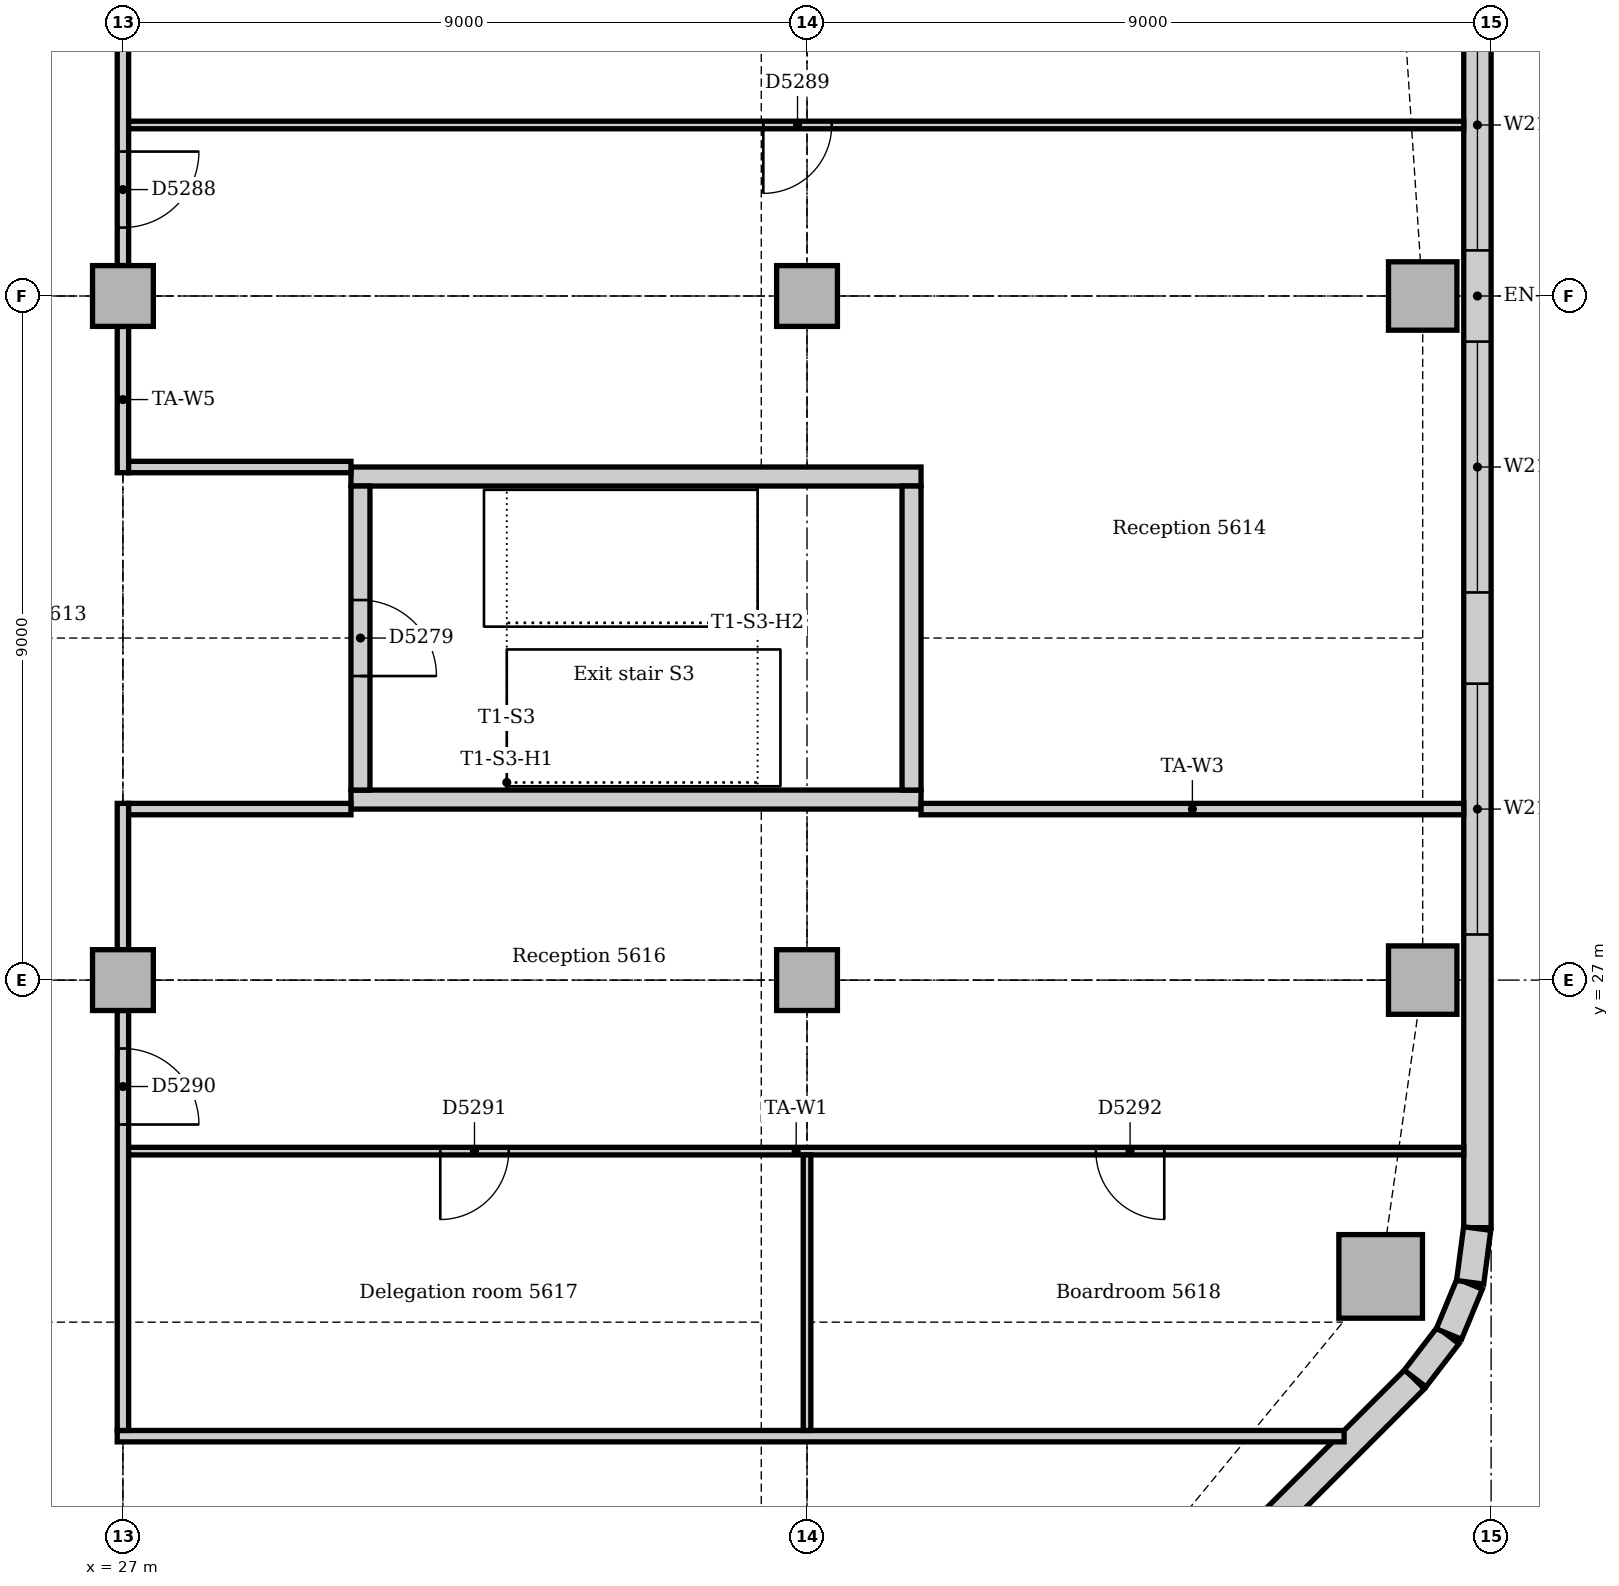
"""IFC4 building model, lengths in metres.
Left out: names, types, materials, properties, quantities, classifications, styles, units other than length and angle.
Written with IfcOpenShell. Run it as: python <this file> out.ifc"""

import sys

from ifc_helpers import new_model, si_unit, direction, frame, frame_2d, origin, origin_2d, place, context, subcontext, project, spatial, rectangle, extrude, element, fill, save


model = new_model("IFC4")
c1 = context("Model", 3, precision=1e-05, world=origin(), true_north=direction((0.0, 1.0)))
c2 = subcontext(c1, "Body", "Model", "MODEL_VIEW")
j1 = project(units=[si_unit("LENGTHUNIT", "METRE"), si_unit("PLANEANGLEUNIT", "RADIAN")], contexts=[c1])
p1 = place(None, origin())
s1 = spatial("IfcSite", under=j1, at=p1, CompositionType="ELEMENT")
p2 = place(p1, origin())
s2 = spatial("IfcBuilding", under=s1, at=p2, CompositionType="ELEMENT")
p3 = place(p2, frame((0.0, 0.0, 234.0)))
s3 = spatial("IfcBuildingStorey", under=s2, at=p3, CompositionType="ELEMENT", Elevation=234.0)
for number, where, z_axis, x_axis in (
    (1, (30.0, 29.375, 0.0), (0.0, 0.0, 1.0), (1.0, 0.0, 0.0)),
    (2, (37.5, 33.625, 0.0), (0.0, 0.0, 1.0), (-1.0, 0.0, 0.0)),
):
    element("IfcWall", number, at=place(p3, frame(where, z_axis=z_axis, x_axis=x_axis)), inside=s3, PredefinedType="SOLIDWALL", context=c2, shape_type="SweptSolid", body=[
        extrude(rectangle(XDim=7.5, YDim=0.25, at=frame_2d((3.75, 0.0))), origin(), (0.0, 0.0, 1.0), 4.0),
    ])
p4 = place(p3, frame((37.375, 29.5, 0.0), z_axis=(0.0, 0.0, 1.0), x_axis=(0.0, 1.0, 0.0)))
e3 = element("IfcWall", 3, at=p4, inside=s3, PredefinedType="SOLIDWALL", context=c2, shape_type="SweptSolid", body=[
    extrude(rectangle(XDim=4.0, YDim=0.25, at=frame_2d((2.0, 0.0))), origin(), (0.0, 0.0, 1.0), 4.0),
])
p5 = place(p3, frame((30.125, 33.5, 0.0), z_axis=(0.0, 0.0, 1.0), x_axis=(0.0, -1.0, 0.0)))
e4 = element("IfcWall", 4, at=p5, inside=s3, PredefinedType="SOLIDWALL", context=c2, shape_type="SweptSolid", body=[
    extrude(rectangle(XDim=4.0, YDim=0.25, at=frame_2d((2.0, 0.0))), origin(), (0.0, 0.0, 1.0), 4.0),
])
p6 = place(p5, frame((1.5, 0.0, 0.0)))
e5 = element("IfcOpeningElement", 5, at=p6, cuts=e4, PredefinedType="OPENING", context=c2, shape_type="SweptSolid", body=[
    extrude(rectangle(XDim=1.0, YDim=2.1, at=frame_2d((0.5, 1.05))), frame((0.0, 0.135, 0.0), z_axis=(0.0, -1.0, 0.0), x_axis=(1.0, 0.0, 0.0)), (0.0, 0.0, 1.0), 0.27),
])
p7 = place(p3, frame((43.547, 23.102, 0.0), z_axis=(0.0, 0.0, 1.0), x_axis=(1.0, 0.0, 0.0)))
e6 = element("IfcColumn", 6, at=p7, inside=s3, PredefinedType="COLUMN", context=c2, shape_type="SweptSolid", body=[
    extrude(rectangle(XDim=1.1, YDim=1.1, at=origin_2d()), origin(), (0.0, 0.0, 1.0), 3.85),
])
for number, where, z_axis, x_axis in (
    (7, (44.1, 27.0, 0.0), (0.0, 0.0, 1.0), (1.0, 0.0, 0.0)),
    (8, (44.1, 36.0, 0.0), (0.0, 0.0, 1.0), (1.0, 0.0, 0.0)),
):
    element("IfcColumn", number, at=place(p3, frame(where, z_axis=z_axis, x_axis=x_axis)), inside=s3, PredefinedType="COLUMN", context=c2, shape_type="SweptSolid", body=[
        extrude(rectangle(XDim=0.9, YDim=0.9, at=origin_2d()), origin(), (0.0, 0.0, 1.0), 3.85),
    ])
for number, where, z_axis, x_axis in (
    (9, (27.0, 27.0, 0.0), (0.0, 0.0, 1.0), (1.0, 0.0, 0.0)),
    (10, (27.0, 36.0, 0.0), (0.0, 0.0, 1.0), (1.0, 0.0, 0.0)),
    (11, (36.0, 27.0, 0.0), (0.0, 0.0, 1.0), (1.0, 0.0, 0.0)),
    (12, (36.0, 36.0, 0.0), (0.0, 0.0, 1.0), (1.0, 0.0, 0.0)),
):
    element("IfcColumn", number, at=place(p3, frame(where, z_axis=z_axis, x_axis=x_axis)), inside=s3, PredefinedType="COLUMN", context=c2, shape_type="SweptSolid", body=[
        extrude(rectangle(XDim=0.8, YDim=0.8, at=origin_2d()), origin(), (0.0, 0.0, 1.0), 3.85),
    ])
p8 = place(p3, frame((36.751, 14.506, 0.0), z_axis=(0.0, 0.0, 1.0), x_axis=(0.707106781187, 0.707106781187, 0.0)))
e13 = element("IfcWall", 13, at=p8, inside=s3, PredefinedType="STANDARD", context=c2, shape_type="SweptSolid", body=[
    extrude(rectangle(XDim=10.243, YDim=0.36, at=frame_2d((5.121, 0.0))), origin(), (0.0, 0.0, 1.0), 3.85),
])
p9 = place(p8, frame((5.021, 0.0, 0.9)))
e14 = element("IfcOpeningElement", 14, at=p9, cuts=e13, PredefinedType="OPENING", context=c2, shape_type="SweptSolid", body=[
    extrude(rectangle(XDim=1.8, YDim=1.6, at=frame_2d((0.9, 0.8))), frame((0.0, 0.19, 0.0), z_axis=(0.0, -1.0, 0.0), x_axis=(1.0, 0.0, 0.0)), (0.0, 0.0, 1.0), 0.38),
])
p10 = place(p3, frame((44.82, 23.743, 0.0), z_axis=(0.0, 0.0, 1.0), x_axis=(0.0, 1.0, 0.0)))
e15 = element("IfcWall", 15, at=p10, inside=s3, PredefinedType="STANDARD", context=c2, shape_type="SweptSolid", body=[
    extrude(rectangle(XDim=24.515, YDim=0.36, at=frame_2d((12.257, 0.0))), origin(), (0.0, 0.0, 1.0), 3.85),
])
p11 = place(p10, frame((3.857, 0.0, 0.9)))
e16 = element("IfcOpeningElement", 16, at=p11, cuts=e15, PredefinedType="OPENING", context=c2, shape_type="SweptSolid", body=[
    extrude(rectangle(XDim=3.3, YDim=1.6, at=frame_2d((1.65, 0.8))), frame((0.0, 0.19, 0.0), z_axis=(0.0, -1.0, 0.0), x_axis=(1.0, 0.0, 0.0)), (0.0, 0.0, 1.0), 0.38),
])
p12 = place(p10, frame((8.357, 0.0, 0.9)))
e17 = element("IfcOpeningElement", 17, at=p12, cuts=e15, PredefinedType="OPENING", context=c2, shape_type="SweptSolid", body=[
    extrude(rectangle(XDim=3.3, YDim=1.6, at=frame_2d((1.65, 0.8))), frame((0.0, 0.19, 0.0), z_axis=(0.0, -1.0, 0.0), x_axis=(1.0, 0.0, 0.0)), (0.0, 0.0, 1.0), 0.38),
])
p13 = place(p10, frame((12.857, 0.0, 0.9)))
e18 = element("IfcOpeningElement", 18, at=p13, cuts=e15, PredefinedType="OPENING", context=c2, shape_type="SweptSolid", body=[
    extrude(rectangle(XDim=3.3, YDim=1.6, at=frame_2d((1.65, 0.8))), frame((0.0, 0.19, 0.0), z_axis=(0.0, -1.0, 0.0), x_axis=(1.0, 0.0, 0.0)), (0.0, 0.0, 1.0), 0.38),
])
p14 = place(p10, frame((17.357, 0.0, 0.9)))
e19 = element("IfcOpeningElement", 19, at=p14, cuts=e15, PredefinedType="OPENING", context=c2, shape_type="SweptSolid", body=[
    extrude(rectangle(XDim=3.3, YDim=1.6, at=frame_2d((1.65, 0.8))), frame((0.0, 0.19, 0.0), z_axis=(0.0, -1.0, 0.0), x_axis=(1.0, 0.0, 0.0)), (0.0, 0.0, 1.0), 0.38),
])
p15 = place(p3, frame((44.0, 21.759, 0.0), z_axis=(0.0, 0.0, 1.0), x_axis=(0.608802368033, 0.793321924995, 0.0)))
e20 = element("IfcWall", 20, at=p15, inside=s3, PredefinedType="STANDARD", context=c2, shape_type="SweptSolid", body=[
    extrude(rectangle(XDim=0.713, YDim=0.36, at=frame_2d((0.357, 0.0))), origin(), (0.0, 0.0, 1.0), 3.85),
])
for number, where, z_axis, x_axis in (
    (21, (44.445, 22.344, 0.0), (0.0, 0.0, 1.0), (0.383, 0.924, 0.0)),
    (22, (44.724, 23.024, 0.0), (0.0, 0.0, 1.0), (0.131, 0.991, 0.0)),
):
    element("IfcWall", number, at=place(p3, frame(where, z_axis=z_axis, x_axis=x_axis)), inside=s3, PredefinedType="STANDARD", context=c2, shape_type="SweptSolid", body=[
        extrude(rectangle(XDim=0.713, YDim=0.36, at=frame_2d((0.356, 0.0))), origin(), (0.0, 0.0, 1.0), 3.85),
    ])
p16 = place(p3, frame((26.925, 21.0, 0.0), z_axis=(0.0, 0.0, 1.0), x_axis=(1.0, 0.0, 0.0)))
e23 = element("IfcWall", 23, at=p16, inside=s3, PredefinedType="PARTITIONING", context=c2, shape_type="SweptSolid", body=[
    extrude(rectangle(XDim=16.141, YDim=0.15, at=frame_2d((8.07, 0.0))), origin(), (0.0, 0.0, 1.0), 3.85),
])
p17 = place(p3, frame((27.0, 33.675, 0.0), z_axis=(0.0, 0.0, 1.0), x_axis=(0.0, 1.0, 0.0)))
e24 = element("IfcWall", 24, at=p17, inside=s3, PredefinedType="PARTITIONING", context=c2, shape_type="SweptSolid", body=[
    extrude(rectangle(XDim=1.925, YDim=0.15, at=frame_2d((0.963, 0.0))), origin(), (0.0, 0.0, 1.0), 3.35),
])
p18 = place(p3, frame((27.0, 36.4, 0.0), z_axis=(0.0, 0.0, 1.0), x_axis=(0.0, 1.0, 0.0)))
e25 = element("IfcWall", 25, at=p18, inside=s3, PredefinedType="PARTITIONING", context=c2, shape_type="SweptSolid", body=[
    extrude(rectangle(XDim=7.3, YDim=0.15, at=frame_2d((3.65, 0.0))), origin(), (0.0, 0.0, 1.0), 3.35),
])
p19 = place(p18, frame((0.5, 0.0, 0.0)))
e26 = element("IfcOpeningElement", 26, at=p19, cuts=e25, PredefinedType="OPENING", context=c2, shape_type="SweptSolid", body=[
    extrude(rectangle(XDim=1.0, YDim=2.1, at=frame_2d((0.5, 1.05))), frame((0.0, 0.085, 0.0), z_axis=(0.0, -1.0, 0.0), x_axis=(1.0, 0.0, 0.0)), (0.0, 0.0, 1.0), 0.17),
])
p20 = place(p3, frame((27.0, 21.075, 0.0), z_axis=(0.0, 0.0, 1.0), x_axis=(0.0, 1.0, 0.0)))
e27 = element("IfcWall", 27, at=p20, inside=s3, PredefinedType="PARTITIONING", context=c2, shape_type="SweptSolid", body=[
    extrude(rectangle(XDim=5.525, YDim=0.15, at=frame_2d((2.763, 0.0))), origin(), (0.0, 0.0, 1.0), 3.35),
])
p21 = place(p20, frame((4.025, 0.0, 0.0)))
e28 = element("IfcOpeningElement", 28, at=p21, cuts=e27, PredefinedType="OPENING", context=c2, shape_type="SweptSolid", body=[
    extrude(rectangle(XDim=1.0, YDim=2.1, at=frame_2d((0.5, 1.05))), frame((0.0, 0.085, 0.0), z_axis=(0.0, -1.0, 0.0), x_axis=(1.0, 0.0, 0.0)), (0.0, 0.0, 1.0), 0.17),
])
p22 = place(p3, frame((27.0, 27.4, 0.0), z_axis=(0.0, 0.0, 1.0), x_axis=(0.0, 1.0, 0.0)))
e29 = element("IfcWall", 29, at=p22, inside=s3, PredefinedType="PARTITIONING", context=c2, shape_type="SweptSolid", body=[
    extrude(rectangle(XDim=1.925, YDim=0.15, at=frame_2d((0.963, 0.0))), origin(), (0.0, 0.0, 1.0), 3.35),
])
for number, where, z_axis, x_axis in (
    (30, (27.075, 29.25, 0.0), (0.0, 0.0, 1.0), (1.0, 0.0, 0.0)),
    (31, (27.075, 33.75, 0.0), (0.0, 0.0, 1.0), (1.0, 0.0, 0.0)),
):
    element("IfcWall", number, at=place(p3, frame(where, z_axis=z_axis, x_axis=x_axis)), inside=s3, PredefinedType="PARTITIONING", context=c2, shape_type="SweptSolid", body=[
        extrude(rectangle(XDim=2.925, YDim=0.15, at=frame_2d((1.462, 0.0))), origin(), (0.0, 0.0, 1.0), 3.85),
    ])
p23 = place(p3, frame((37.5, 29.25, 0.0), z_axis=(0.0, 0.0, 1.0), x_axis=(1.0, 0.0, 0.0)))
e32 = element("IfcWall", 32, at=p23, inside=s3, PredefinedType="PARTITIONING", context=c2, shape_type="SweptSolid", body=[
    extrude(rectangle(XDim=7.14, YDim=0.15, at=frame_2d((3.57, 0.0))), origin(), (0.0, 0.0, 1.0), 3.85),
])
p24 = place(p3, frame((27.075, 24.75, 0.0), z_axis=(0.0, 0.0, 1.0), x_axis=(1.0, 0.0, 0.0)))
e33 = element("IfcWall", 33, at=p24, inside=s3, PredefinedType="PARTITIONING", context=c2, shape_type="SweptSolid", body=[
    extrude(rectangle(XDim=17.565, YDim=0.1, at=frame_2d((8.783, 0.0))), origin(), (0.0, 0.0, 1.0), 3.85),
])
p25 = place(p24, frame((4.1, 0.0, 0.0)))
e34 = element("IfcOpeningElement", 34, at=p25, cuts=e33, PredefinedType="OPENING", context=c2, shape_type="SweptSolid", body=[
    extrude(rectangle(XDim=0.9, YDim=2.1, at=frame_2d((0.45, 1.05))), frame((0.0, 0.06, 0.0), z_axis=(0.0, -1.0, 0.0), x_axis=(1.0, 0.0, 0.0)), (0.0, 0.0, 1.0), 0.12),
])
p26 = place(p24, frame((12.725, 0.0, 0.0)))
e35 = element("IfcOpeningElement", 35, at=p26, cuts=e33, PredefinedType="OPENING", context=c2, shape_type="SweptSolid", body=[
    extrude(rectangle(XDim=0.9, YDim=2.1, at=frame_2d((0.45, 1.05))), frame((0.0, 0.06, 0.0), z_axis=(0.0, -1.0, 0.0), x_axis=(1.0, 0.0, 0.0)), (0.0, 0.0, 1.0), 0.12),
])
p27 = place(p3, frame((27.075, 38.25, 0.0), z_axis=(0.0, 0.0, 1.0), x_axis=(1.0, 0.0, 0.0)))
e36 = element("IfcWall", 36, at=p27, inside=s3, PredefinedType="PARTITIONING", context=c2, shape_type="SweptSolid", body=[
    extrude(rectangle(XDim=17.565, YDim=0.1, at=frame_2d((8.783, 0.0))), origin(), (0.0, 0.0, 1.0), 3.85),
])
p28 = place(p27, frame((8.35, 0.0, 0.0)))
e37 = element("IfcOpeningElement", 37, at=p28, cuts=e36, PredefinedType="OPENING", context=c2, shape_type="SweptSolid", body=[
    extrude(rectangle(XDim=0.9, YDim=2.1, at=frame_2d((0.45, 1.05))), frame((0.0, 0.06, 0.0), z_axis=(0.0, -1.0, 0.0), x_axis=(1.0, 0.0, 0.0)), (0.0, 0.0, 1.0), 0.12),
])
p29 = place(p3, frame((36.0, 21.075, 0.0), z_axis=(0.0, 0.0, 1.0), x_axis=(0.0, 1.0, 0.0)))
e38 = element("IfcWall", 38, at=p29, inside=s3, PredefinedType="PARTITIONING", context=c2, shape_type="SweptSolid", body=[
    extrude(rectangle(XDim=3.625, YDim=0.1, at=frame_2d((1.812, 0.0))), origin(), (0.0, 0.0, 1.0), 3.35),
])
p30 = place(p11, origin())
e39 = element("IfcWindow", 39, at=p30, inside=s3, PartitioningType="SINGLE_PANEL", PredefinedType="WINDOW", context=c2, shape_type="SweptSolid", body=[
    extrude(rectangle(XDim=3.3, YDim=1.6, at=frame_2d((1.65, 0.8))), frame((0.0, 0.13, 0.0), z_axis=(0.0, -1.0, 0.0), x_axis=(1.0, 0.0, 0.0)), (0.0, 0.0, 1.0), 0.06),
])
fill(e16, e39)
p31 = place(p12, origin())
e40 = element("IfcWindow", 40, at=p31, inside=s3, PartitioningType="SINGLE_PANEL", PredefinedType="WINDOW", context=c2, shape_type="SweptSolid", body=[
    extrude(rectangle(XDim=3.3, YDim=1.6, at=frame_2d((1.65, 0.8))), frame((0.0, 0.13, 0.0), z_axis=(0.0, -1.0, 0.0), x_axis=(1.0, 0.0, 0.0)), (0.0, 0.0, 1.0), 0.06),
])
fill(e17, e40)
p32 = place(p13, origin())
e41 = element("IfcWindow", 41, at=p32, inside=s3, PartitioningType="SINGLE_PANEL", PredefinedType="WINDOW", context=c2, shape_type="SweptSolid", body=[
    extrude(rectangle(XDim=3.3, YDim=1.6, at=frame_2d((1.65, 0.8))), frame((0.0, 0.13, 0.0), z_axis=(0.0, -1.0, 0.0), x_axis=(1.0, 0.0, 0.0)), (0.0, 0.0, 1.0), 0.06),
])
fill(e18, e41)
p33 = place(p6, origin())
e42 = element("IfcDoor", 42, at=p33, inside=s3, OperationType="SINGLE_SWING_RIGHT", PredefinedType="DOOR", context=c2, shape_type="SweptSolid", body=[
    extrude(rectangle(XDim=1.0, YDim=2.1, at=frame_2d((0.5, 1.05))), frame((0.0, 0.025, 0.0), z_axis=(0.0, -1.0, 0.0), x_axis=(1.0, 0.0, 0.0)), (0.0, 0.0, 1.0), 0.05),
])
fill(e5, e42)
p34 = place(p19, frame((1.0, 0.0, 0.0), z_axis=(0.0, 0.0, 1.0), x_axis=(-1.0, 0.0, 0.0)))
e43 = element("IfcDoor", 43, at=p34, inside=s3, OperationType="SINGLE_SWING_LEFT", PredefinedType="DOOR", context=c2, shape_type="SweptSolid", body=[
    extrude(rectangle(XDim=1.0, YDim=2.1, at=frame_2d((0.5, 1.05))), frame((0.0, 0.025, 0.0), z_axis=(0.0, -1.0, 0.0), x_axis=(1.0, 0.0, 0.0)), (0.0, 0.0, 1.0), 0.05),
])
fill(e26, e43)
p35 = place(p28, frame((0.9, 0.0, 0.0), z_axis=(0.0, 0.0, 1.0), x_axis=(-1.0, 0.0, 0.0)))
e44 = element("IfcDoor", 44, at=p35, inside=s3, OperationType="SINGLE_SWING_RIGHT", PredefinedType="DOOR", context=c2, shape_type="SweptSolid", body=[
    extrude(rectangle(XDim=0.9, YDim=2.1, at=frame_2d((0.45, 1.05))), frame((0.0, 0.025, 0.0), z_axis=(0.0, -1.0, 0.0), x_axis=(1.0, 0.0, 0.0)), (0.0, 0.0, 1.0), 0.05),
])
fill(e37, e44)
p36 = place(p21, frame((1.0, 0.0, 0.0), z_axis=(0.0, 0.0, 1.0), x_axis=(-1.0, 0.0, 0.0)))
e45 = element("IfcDoor", 45, at=p36, inside=s3, OperationType="SINGLE_SWING_RIGHT", PredefinedType="DOOR", context=c2, shape_type="SweptSolid", body=[
    extrude(rectangle(XDim=1.0, YDim=2.1, at=frame_2d((0.5, 1.05))), frame((0.0, 0.025, 0.0), z_axis=(0.0, -1.0, 0.0), x_axis=(1.0, 0.0, 0.0)), (0.0, 0.0, 1.0), 0.05),
])
fill(e28, e45)
p37 = place(p25, frame((0.9, 0.0, 0.0), z_axis=(0.0, 0.0, 1.0), x_axis=(-1.0, 0.0, 0.0)))
e46 = element("IfcDoor", 46, at=p37, inside=s3, OperationType="SINGLE_SWING_RIGHT", PredefinedType="DOOR", context=c2, shape_type="SweptSolid", body=[
    extrude(rectangle(XDim=0.9, YDim=2.1, at=frame_2d((0.45, 1.05))), frame((0.0, 0.025, 0.0), z_axis=(0.0, -1.0, 0.0), x_axis=(1.0, 0.0, 0.0)), (0.0, 0.0, 1.0), 0.05),
])
fill(e34, e46)
p38 = place(p26, frame((0.9, 0.0, 0.0), z_axis=(0.0, 0.0, 1.0), x_axis=(-1.0, 0.0, 0.0)))
e47 = element("IfcDoor", 47, at=p38, inside=s3, OperationType="SINGLE_SWING_LEFT", PredefinedType="DOOR", context=c2, shape_type="SweptSolid", body=[
    extrude(rectangle(XDim=0.9, YDim=2.1, at=frame_2d((0.45, 1.05))), frame((0.0, 0.025, 0.0), z_axis=(0.0, -1.0, 0.0), x_axis=(1.0, 0.0, 0.0)), (0.0, 0.0, 1.0), 0.05),
])
fill(e35, e47)
save(model, sys.argv[1])
